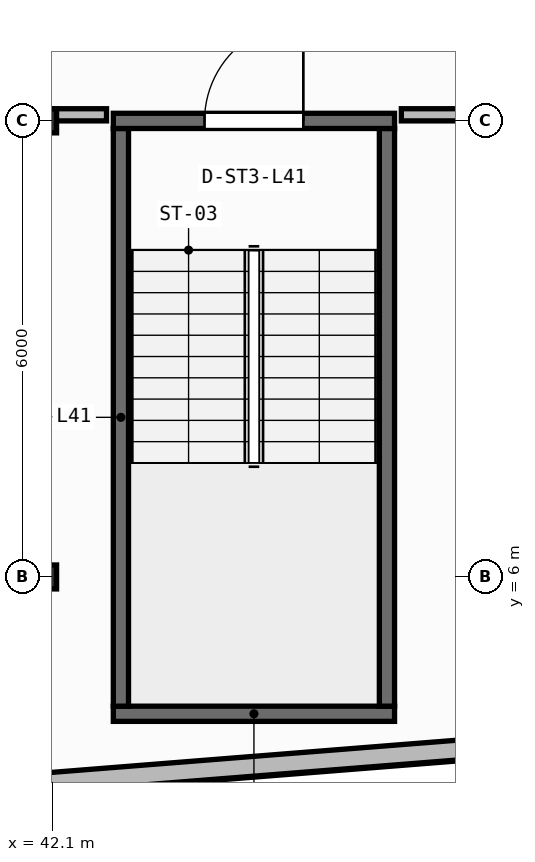
"""IFC4 building model, lengths in metres.
Left out: names, types, materials, properties, quantities, classifications, styles, units other than length and angle.
Written with IfcOpenShell. Run it as: python <this file> out.ifc"""

import sys

from ifc_helpers import new_model, si_unit, direction, frame, frame_2d, origin, origin_2d, place, context, subcontext, project, spatial, rectangle, i_section, extrude, element, fill, save


model = new_model("IFC4")
c1 = context("Model", 3, precision=1e-05, world=origin(), true_north=direction((0.0, 1.0)))
c2 = subcontext(c1, "Body", "Model", "MODEL_VIEW")
j1 = project(units=[si_unit("LENGTHUNIT", "METRE"), si_unit("PLANEANGLEUNIT", "RADIAN")], contexts=[c1])
p1 = place(None, origin())
s1 = spatial("IfcSite", under=j1, at=p1, CompositionType="ELEMENT")
p2 = place(p1, origin())
s2 = spatial("IfcBuilding", under=s1, at=p2, CompositionType="ELEMENT")
p3 = place(p2, frame((0.0, 0.0, 166.55)))
s3 = spatial("IfcBuildingStorey", under=s2, at=p3, CompositionType="ELEMENT", Elevation=166.55)
for number, where, z_axis, x_axis in (
    (1, (42.0, 6.0, 0.0), (0.0, 0.0, 1.0), (1.0, 0.0, 0.0)),
    (2, (42.0, 12.0, 0.0), (0.0, 0.0, 1.0), (1.0, 0.0, 0.0)),
):
    element("IfcColumn", number, at=place(p3, frame(where, z_axis=z_axis, x_axis=x_axis)), inside=s3, PredefinedType="COLUMN", context=c2, shape_type="SweptSolid", body=[
        extrude(i_section(OverallWidth=0.307, OverallDepth=0.315, WebThickness=0.012, FlangeThickness=0.019, FilletRadius=0.017, at=origin_2d()), origin(), (0.0, 0.0, 1.0), 3.95),
    ])
p4 = place(p3, frame((2.76, 0.173, 0.0), z_axis=(0.0, 0.0, 1.0), x_axis=(0.996857931723, 0.079210251617, 0.0)))
e3 = element("IfcWall", 3, at=p4, inside=s3, PredefinedType="STANDARD", context=c2, shape_type="SweptSolid", body=[
    extrude(rectangle(XDim=51.442, YDim=0.26, at=frame_2d((25.721, 0.0))), origin(), (0.0, 0.0, 1.0), 3.71),
])
p5 = place(p4, frame((24.521, 0.0, 0.9)))
e4 = element("IfcOpeningElement", 4, at=p5, cuts=e3, PredefinedType="OPENING", context=c2, shape_type="SweptSolid", body=[
    extrude(rectangle(XDim=2.4, YDim=1.65, at=frame_2d((1.2, 0.825))), frame((0.0, 0.14, 0.0), z_axis=(0.0, -1.0, 0.0), x_axis=(1.0, 0.0, 0.0)), (0.0, 0.0, 1.0), 0.28),
])
p6 = place(p3, frame((42.9, 4.2, 0.0), z_axis=(0.0, 0.0, 1.0), x_axis=(1.0, 0.0, 0.0)))
e5 = element("IfcWall", 5, at=p6, inside=s3, PredefinedType="SHEAR", context=c2, shape_type="SweptSolid", body=[
    extrude(rectangle(XDim=3.7, YDim=0.2, at=frame_2d((1.85, 0.0))), origin(), (0.0, 0.0, 1.0), 3.71),
])
for number, where, z_axis, x_axis in (
    (6, (43.0, 4.3, 0.0), (0.0, 0.0, 1.0), (0.0, 1.0, 0.0)),
    (7, (46.5, 4.3, 0.0), (0.0, 0.0, 1.0), (0.0, 1.0, 0.0)),
):
    element("IfcWall", number, at=place(p3, frame(where, z_axis=z_axis, x_axis=x_axis)), inside=s3, PredefinedType="SHEAR", context=c2, shape_type="SweptSolid", body=[
        extrude(rectangle(XDim=7.6, YDim=0.2, at=frame_2d((3.8, 0.0))), origin(), (0.0, 0.0, 1.0), 3.71),
    ])
p7 = place(p3, frame((42.9, 12.0, 0.0), z_axis=(0.0, 0.0, 1.0), x_axis=(1.0, 0.0, 0.0)))
e8 = element("IfcWall", 8, at=p7, inside=s3, PredefinedType="SHEAR", context=c2, shape_type="SweptSolid", body=[
    extrude(rectangle(XDim=3.7, YDim=0.2, at=frame_2d((1.85, 0.0))), origin(), (0.0, 0.0, 1.0), 3.71),
])
p8 = place(p7, frame((1.2, 0.0, 0.0)))
e9 = element("IfcOpeningElement", 9, at=p8, cuts=e8, PredefinedType="OPENING", context=c2, shape_type="SweptSolid", body=[
    extrude(rectangle(XDim=1.3, YDim=2.15, at=frame_2d((0.65, 1.075))), frame((0.0, 0.11, 0.0), z_axis=(0.0, -1.0, 0.0), x_axis=(1.0, 0.0, 0.0)), (0.0, 0.0, 1.0), 0.22),
])
p9 = place(p3, frame((40.03, 12.08, 0.0), z_axis=(0.0, 0.0, 1.0), x_axis=(1.0, 0.0, 0.0)))
e10 = element("IfcWall", 10, at=p9, inside=s3, PredefinedType="PARTITIONING", context=c2, shape_type="SweptSolid", body=[
    extrude(rectangle(XDim=2.781, YDim=0.16, at=frame_2d((1.39, 0.0))), origin(), (0.0, 0.0, 1.0), 3.083),
])
p10 = place(p3, frame((46.689, 12.08, 0.0), z_axis=(0.0, 0.0, 1.0), x_axis=(1.0, 0.0, 0.0)))
e11 = element("IfcWall", 11, at=p10, inside=s3, PredefinedType="PARTITIONING", context=c2, shape_type="SweptSolid", body=[
    extrude(rectangle(XDim=3.011, YDim=0.16, at=frame_2d((1.505, 0.0))), origin(), (0.0, 0.0, 1.0), 3.083),
])
p11 = place(p8, origin())
e12 = element("IfcDoor", 12, at=p11, inside=s3, OperationType="SINGLE_SWING_RIGHT", PredefinedType="DOOR", context=c2, shape_type="SweptSolid", body=[
    extrude(rectangle(XDim=1.3, YDim=2.15, at=frame_2d((0.65, 1.075))), frame((0.0, 0.025, 0.0), z_axis=(0.0, -1.0, 0.0), x_axis=(1.0, 0.0, 0.0)), (0.0, 0.0, 1.0), 0.05),
])
fill(e9, e12)
save(model, sys.argv[1])
